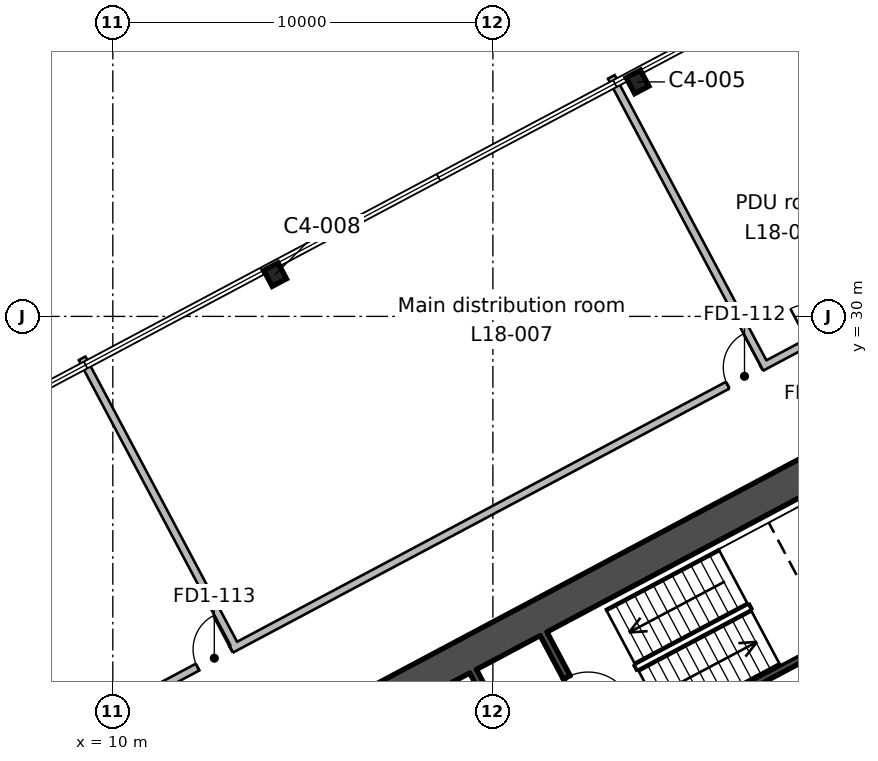
"""IFC4 building model, lengths in metres.
Left out: names, types, materials, properties, quantities, classifications, styles, units other than length and angle.
Written with IfcOpenShell. Run it as: python <this file> out.ifc"""

import sys

from ifc_helpers import new_model, si_unit, direction, frame, frame_2d, origin, origin_2d, place, context, subcontext, project, spatial, rectangle, i_section, extrude, element, fill, save


model = new_model("IFC4")
c1 = context("Model", 3, precision=1e-05, world=origin(), true_north=direction((0.0, 1.0)))
c2 = subcontext(c1, "Body", "Model", "MODEL_VIEW")
j1 = project(units=[si_unit("LENGTHUNIT", "METRE"), si_unit("PLANEANGLEUNIT", "RADIAN")], contexts=[c1])
p1 = place(None, origin())
s1 = spatial("IfcSite", under=j1, at=p1, CompositionType="ELEMENT")
p2 = place(p1, origin())
s2 = spatial("IfcBuilding", under=s1, at=p2, CompositionType="ELEMENT")
p3 = place(p2, frame((0.0, 0.0, 93.8)))
s3 = spatial("IfcBuildingStorey", under=s2, at=p3, CompositionType="ELEMENT", Elevation=93.8)
for number, where, z_axis, x_axis in (
    (1, (14.27, 31.1, 0.0), (0.0, 0.0, 1.0), (-0.883, -0.469, 0.0)),
    (2, (23.806, 36.17, 0.0), (0.0, 0.0, 1.0), (-0.883, -0.469, 0.0)),
):
    element("IfcColumn", number, at=place(p3, frame(where, z_axis=z_axis, x_axis=x_axis)), inside=s3, PredefinedType="COLUMN", context=c2, shape_type="SweptSolid", body=[
        extrude(i_section(OverallWidth=0.424, OverallDepth=0.475, WebThickness=0.048, FlangeThickness=0.077, FilletRadius=0.015, at=origin_2d()), origin(), (0.0, 0.0, 1.0), 4.6),
    ])
p4 = place(p3, frame((10.438, 16.366, 0.0), z_axis=(0.0, 0.0, 1.0), x_axis=(0.88294509198, 0.469476266226, 0.0)))
e3 = element("IfcWall", 3, at=p4, inside=s3, PredefinedType="SHEAR", context=c2, shape_type="SweptSolid", body=[
    extrude(rectangle(XDim=20.2, YDim=0.9, at=frame_2d((10.1, 0.0))), origin(), (0.0, 0.0, 1.0), 4.6),
])
p5 = place(p3, frame((22.906, 14.218, 0.0), z_axis=(0.0, 0.0, 1.0), x_axis=(-0.469480409012, 0.88294288918, 0.0)))
e4 = element("IfcWall", 4, at=p5, inside=s3, PredefinedType="SHEAR", context=c2, shape_type="SweptSolid", body=[
    extrude(rectangle(XDim=7.3, YDim=0.2, at=frame_2d((3.65, 0.0))), origin(), (0.0, 0.0, 1.0), 4.6),
])
p6 = place(p5, frame((2.7, 0.0, 0.0)))
e5 = element("IfcOpeningElement", 5, at=p6, cuts=e4, PredefinedType="OPENING", context=c2, shape_type="SweptSolid", body=[
    extrude(rectangle(XDim=0.9, YDim=2.1, at=frame_2d((0.45, 1.05))), frame((0.0, 0.11, 0.0), z_axis=(0.0, -1.0, 0.0), x_axis=(1.0, 0.0, 0.0)), (0.0, 0.0, 1.0), 0.22),
])
p7 = place(p5, frame((5.2, 0.0, 0.0)))
e6 = element("IfcOpeningElement", 6, at=p7, cuts=e4, PredefinedType="OPENING", context=c2, shape_type="SweptSolid", body=[
    extrude(rectangle(XDim=0.9, YDim=2.1, at=frame_2d((0.45, 1.05))), frame((0.0, 0.11, 0.0), z_axis=(0.0, -1.0, 0.0), x_axis=(1.0, 0.0, 0.0)), (0.0, 0.0, 1.0), 0.22),
])
p8 = place(p3, frame((24.76, 15.204, 0.0), z_axis=(0.0, 0.0, 1.0), x_axis=(-0.469494272526, 0.882935517501, 0.0)))
e7 = element("IfcWall", 7, at=p8, inside=s3, PredefinedType="SHEAR", context=c2, shape_type="SweptSolid", body=[
    extrude(rectangle(XDim=7.3, YDim=0.2, at=frame_2d((3.65, 0.0))), origin(), (0.0, 0.0, 1.0), 4.6),
])
p9 = place(p8, frame((4.8, 0.0, 0.0)))
e8 = element("IfcOpeningElement", 8, at=p9, cuts=e7, PredefinedType="OPENING", context=c2, shape_type="SweptSolid", body=[
    extrude(rectangle(XDim=1.2, YDim=2.1, at=frame_2d((0.6, 1.05))), frame((0.0, 0.11, 0.0), z_axis=(0.0, -1.0, 0.0), x_axis=(1.0, 0.0, 0.0)), (0.0, 0.0, 1.0), 0.22),
])
p10 = place(p3, frame((23.769, 17.282, 0.0), z_axis=(0.0, 0.0, 1.0), x_axis=(0.882940221191, 0.469485426614, 0.0)))
e9 = element("IfcWall", 9, at=p10, inside=s3, PredefinedType="SHEAR", context=c2, shape_type="SweptSolid", body=[
    extrude(rectangle(XDim=8.0, YDim=0.2, at=frame_2d((4.0, 0.0))), origin(), (0.0, 0.0, 1.0), 4.6),
])
p11 = place(p3, frame((23.182, 18.385, 0.0), z_axis=(0.0, 0.0, 1.0), x_axis=(0.88295287151, 0.469461634952, 0.0)))
e10 = element("IfcWall", 10, at=p11, inside=s3, PredefinedType="SHEAR", context=c2, shape_type="SweptSolid", body=[
    extrude(rectangle(XDim=8.0, YDim=0.2, at=frame_2d((4.0, 0.0))), origin(), (0.0, 0.0, 1.0), 4.6),
])
p12 = place(p3, frame((0.0, 14.27, 0.0), z_axis=(0.0, 0.0, 1.0), x_axis=(0.882946949892, 0.46947277203, 0.0)))
e11 = element("IfcWall", 11, at=p12, inside=s3, PredefinedType="PARTITIONING", context=c2, shape_type="SweptSolid", body=[
    extrude(rectangle(XDim=65.501, YDim=0.2, at=frame_2d((32.75, 0.0))), origin(), (0.0, 0.0, 1.0), 4.2),
])
p13 = place(p12, frame((35.45, 0.0, 0.0)))
e12 = element("IfcOpeningElement", 12, at=p13, cuts=e11, PredefinedType="OPENING", context=c2, shape_type="SweptSolid", body=[
    extrude(rectangle(XDim=1.0, YDim=2.1, at=frame_2d((0.5, 1.05))), frame((0.0, 0.11, 0.0), z_axis=(0.0, -1.0, 0.0), x_axis=(1.0, 0.0, 0.0)), (0.0, 0.0, 1.0), 0.22),
])
p14 = place(p12, frame((32.05, 0.0, 0.0)))
e13 = element("IfcOpeningElement", 13, at=p14, cuts=e11, PredefinedType="OPENING", context=c2, shape_type="SweptSolid", body=[
    extrude(rectangle(XDim=1.0, YDim=2.1, at=frame_2d((0.5, 1.05))), frame((0.0, 0.11, 0.0), z_axis=(0.0, -1.0, 0.0), x_axis=(1.0, 0.0, 0.0)), (0.0, 0.0, 1.0), 0.22),
])
p15 = place(p12, frame((29.65, 0.0, 0.0)))
e14 = element("IfcOpeningElement", 14, at=p15, cuts=e11, PredefinedType="OPENING", context=c2, shape_type="SweptSolid", body=[
    extrude(rectangle(XDim=1.0, YDim=2.1, at=frame_2d((0.5, 1.05))), frame((0.0, 0.11, 0.0), z_axis=(0.0, -1.0, 0.0), x_axis=(1.0, 0.0, 0.0)), (0.0, 0.0, 1.0), 0.22),
])
p16 = place(p12, frame((13.85, 0.0, 0.0)))
e15 = element("IfcOpeningElement", 15, at=p16, cuts=e11, PredefinedType="OPENING", context=c2, shape_type="SweptSolid", body=[
    extrude(rectangle(XDim=1.0, YDim=2.1, at=frame_2d((0.5, 1.05))), frame((0.0, 0.11, 0.0), z_axis=(0.0, -1.0, 0.0), x_axis=(1.0, 0.0, 0.0)), (0.0, 0.0, 1.0), 0.22),
])
p17 = place(p3, frame((9.191, 28.898, 0.0), z_axis=(0.0, 0.0, 1.0), x_axis=(0.469409112223, -0.882980795579, 0.0)))
e16 = element("IfcWall", 16, at=p17, inside=s3, PredefinedType="PARTITIONING", context=c2, shape_type="SweptSolid", body=[
    extrude(rectangle(XDim=8.6, YDim=0.2, at=frame_2d((4.3, 0.0))), origin(), (0.0, 0.0, 1.0), 4.2),
])
p18 = place(p3, frame((23.117, 36.302, 0.0), z_axis=(0.0, 0.0, 1.0), x_axis=(0.469544705103, -0.882908698513, 0.0)))
e17 = element("IfcWall", 17, at=p18, inside=s3, PredefinedType="PARTITIONING", context=c2, shape_type="SweptSolid", body=[
    extrude(rectangle(XDim=8.6, YDim=0.2, at=frame_2d((4.3, 0.0))), origin(), (0.0, 0.0, 1.0), 4.2),
])
p19 = place(p9, frame((1.2, 0.0, 0.0), z_axis=(0.0, 0.0, 1.0), x_axis=(-1.0, 0.0, 0.0)))
e18 = element("IfcDoor", 18, at=p19, inside=s3, OperationType="SINGLE_SWING_RIGHT", PredefinedType="DOOR", context=c2, shape_type="SweptSolid", body=[
    extrude(rectangle(XDim=1.2, YDim=2.1, at=frame_2d((0.6, 1.05))), frame((0.0, 0.025, 0.0), z_axis=(0.0, -1.0, 0.0), x_axis=(1.0, 0.0, 0.0)), (0.0, 0.0, 1.0), 0.05),
])
fill(e8, e18)
p20 = place(p15, origin())
e19 = element("IfcDoor", 19, at=p20, inside=s3, OperationType="SINGLE_SWING_RIGHT", PredefinedType="DOOR", context=c2, shape_type="SweptSolid", body=[
    extrude(rectangle(XDim=1.0, YDim=2.1, at=frame_2d((0.5, 1.05))), frame((0.0, 0.025, 0.0), z_axis=(0.0, -1.0, 0.0), x_axis=(1.0, 0.0, 0.0)), (0.0, 0.0, 1.0), 0.05),
])
fill(e14, e19)
p21 = place(p16, origin())
e20 = element("IfcDoor", 20, at=p21, inside=s3, OperationType="SINGLE_SWING_RIGHT", PredefinedType="DOOR", context=c2, shape_type="SweptSolid", body=[
    extrude(rectangle(XDim=1.0, YDim=2.1, at=frame_2d((0.5, 1.05))), frame((0.0, 0.025, 0.0), z_axis=(0.0, -1.0, 0.0), x_axis=(1.0, 0.0, 0.0)), (0.0, 0.0, 1.0), 0.05),
])
fill(e15, e20)
save(model, sys.argv[1])
